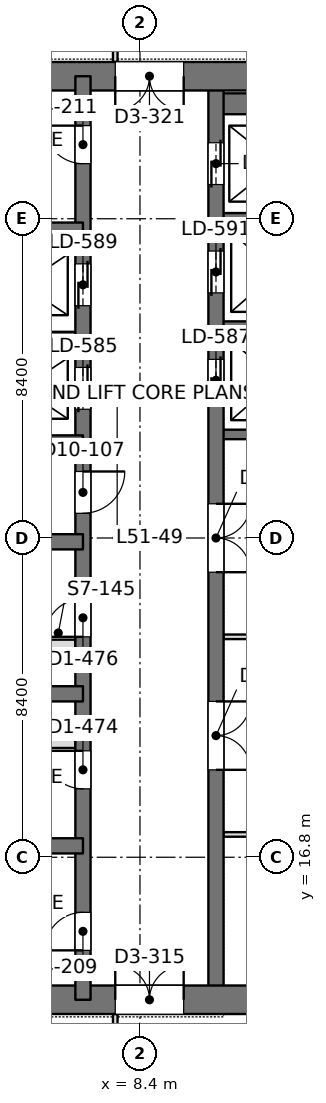
"""IFC4 building model, lengths in metres.
Left out: names, types, materials, properties, quantities, classifications, styles, units other than length and angle.
Written with IfcOpenShell. Run it as: python <this file> out.ifc"""

import sys

from ifc_helpers import new_model, si_unit, direction, frame, frame_2d, origin, place, context, subcontext, project, spatial, rectangle, extrude, element, fill, save


model = new_model("IFC4")
c1 = context("Model", 3, precision=1e-05, world=origin(), true_north=direction((0.0, 1.0)))
c2 = subcontext(c1, "Body", "Model", "MODEL_VIEW")
j1 = project(units=[si_unit("LENGTHUNIT", "METRE"), si_unit("PLANEANGLEUNIT", "RADIAN")], contexts=[c1])
p1 = place(None, origin())
s1 = spatial("IfcSite", under=j1, at=p1, CompositionType="ELEMENT")
p2 = place(p1, origin())
s2 = spatial("IfcBuilding", under=s1, at=p2, CompositionType="ELEMENT")
p3 = place(p2, frame((0.0, 0.0, 223.8)))
s3 = spatial("IfcBuildingStorey", under=s2, at=p3, CompositionType="ELEMENT", Elevation=223.8)
p4 = place(p3, frame((-1.125, 13.05, 0.0), z_axis=(0.0, 0.0, 1.0), x_axis=(1.0, 0.0, 0.0)))
e1 = element("IfcWall", 1, at=p4, inside=s3, PredefinedType="SHEAR", context=c2, shape_type="SweptSolid", body=[
    extrude(rectangle(XDim=17.85, YDim=0.75, at=frame_2d((8.925, 0.0))), origin(), (0.0, 0.0, 1.0), 4.2),
])
p5 = place(p4, frame((8.875, 0.0, 0.0)))
e2 = element("IfcOpeningElement", 2, at=p5, cuts=e1, PredefinedType="OPENING", context=c2, shape_type="SweptSolid", body=[
    extrude(rectangle(XDim=1.8, YDim=2.4, at=frame_2d((0.9, 1.2))), frame((0.0, 0.385, 0.0), z_axis=(0.0, -1.0, 0.0), x_axis=(1.0, 0.0, 0.0)), (0.0, 0.0, 1.0), 0.77),
])
p6 = place(p3, frame((-1.125, 37.35, 0.0), z_axis=(0.0, 0.0, 1.0), x_axis=(1.0, 0.0, 0.0)))
e3 = element("IfcWall", 3, at=p6, inside=s3, PredefinedType="SHEAR", context=c2, shape_type="SweptSolid", body=[
    extrude(rectangle(XDim=17.85, YDim=0.75, at=frame_2d((8.925, 0.0))), origin(), (0.0, 0.0, 1.0), 4.2),
])
p7 = place(p6, frame((8.875, 0.0, 0.0)))
e4 = element("IfcOpeningElement", 4, at=p7, cuts=e3, PredefinedType="OPENING", context=c2, shape_type="SweptSolid", body=[
    extrude(rectangle(XDim=1.8, YDim=2.4, at=frame_2d((0.9, 1.2))), frame((0.0, 0.385, 0.0), z_axis=(0.0, -1.0, 0.0), x_axis=(1.0, 0.0, 0.0)), (0.0, 0.0, 1.0), 0.77),
])
p8 = place(p3, frame((6.9, 13.05, 0.0), z_axis=(0.0, 0.0, 1.0), x_axis=(0.0, 1.0, 0.0)))
e5 = element("IfcWall", 5, at=p8, inside=s3, PredefinedType="SHEAR", context=c2, shape_type="SweptSolid", body=[
    extrude(rectangle(XDim=24.3, YDim=0.4, at=frame_2d((12.15, 0.0))), origin(), (0.0, 0.0, 1.0), 4.2),
])
p9 = place(p8, frame((1.3, 0.0, 0.0)))
e6 = element("IfcOpeningElement", 6, at=p9, cuts=e5, PredefinedType="OPENING", context=c2, shape_type="SweptSolid", body=[
    extrude(rectangle(XDim=1.0, YDim=2.2, at=frame_2d((0.5, 1.1))), frame((0.0, 0.21, 0.0), z_axis=(0.0, -1.0, 0.0), x_axis=(1.0, 0.0, 0.0)), (0.0, 0.0, 1.0), 0.42),
])
p10 = place(p8, frame((22.0, 0.0, 0.0)))
e7 = element("IfcOpeningElement", 7, at=p10, cuts=e5, PredefinedType="OPENING", context=c2, shape_type="SweptSolid", body=[
    extrude(rectangle(XDim=1.0, YDim=2.2, at=frame_2d((0.5, 1.1))), frame((0.0, 0.21, 0.0), z_axis=(0.0, -1.0, 0.0), x_axis=(1.0, 0.0, 0.0)), (0.0, 0.0, 1.0), 0.42),
])
p11 = place(p8, frame((5.55, 0.0, 0.0)))
e8 = element("IfcOpeningElement", 8, at=p11, cuts=e5, PredefinedType="OPENING", context=c2, shape_type="SweptSolid", body=[
    extrude(rectangle(XDim=1.0, YDim=2.2, at=frame_2d((0.5, 1.1))), frame((0.0, 0.21, 0.0), z_axis=(0.0, -1.0, 0.0), x_axis=(1.0, 0.0, 0.0)), (0.0, 0.0, 1.0), 0.42),
])
p12 = place(p8, frame((9.55, 0.0, 0.0)))
e9 = element("IfcOpeningElement", 9, at=p12, cuts=e5, PredefinedType="OPENING", context=c2, shape_type="SweptSolid", body=[
    extrude(rectangle(XDim=1.0, YDim=2.2, at=frame_2d((0.5, 1.1))), frame((0.0, 0.21, 0.0), z_axis=(0.0, -1.0, 0.0), x_axis=(1.0, 0.0, 0.0)), (0.0, 0.0, 1.0), 0.42),
])
p13 = place(p8, frame((12.8, 0.0, 0.0)))
e10 = element("IfcOpeningElement", 10, at=p13, cuts=e5, PredefinedType="OPENING", context=c2, shape_type="SweptSolid", body=[
    extrude(rectangle(XDim=1.1, YDim=2.2, at=frame_2d((0.55, 1.1))), frame((0.0, 0.21, 0.0), z_axis=(0.0, -1.0, 0.0), x_axis=(1.0, 0.0, 0.0)), (0.0, 0.0, 1.0), 0.42),
])
p14 = place(p8, frame((15.538, 0.0, 0.0)))
e11 = element("IfcOpeningElement", 11, at=p14, cuts=e5, PredefinedType="OPENING", context=c2, shape_type="SweptSolid", body=[
    extrude(rectangle(XDim=1.1, YDim=2.2, at=frame_2d((0.55, 1.1))), frame((0.0, 0.21, 0.0), z_axis=(0.0, -1.0, 0.0), x_axis=(1.0, 0.0, 0.0)), (0.0, 0.0, 1.0), 0.42),
])
p15 = place(p8, frame((18.262, 0.0, 0.0)))
e12 = element("IfcOpeningElement", 12, at=p15, cuts=e5, PredefinedType="OPENING", context=c2, shape_type="SweptSolid", body=[
    extrude(rectangle(XDim=1.1, YDim=2.2, at=frame_2d((0.55, 1.1))), frame((0.0, 0.21, 0.0), z_axis=(0.0, -1.0, 0.0), x_axis=(1.0, 0.0, 0.0)), (0.0, 0.0, 1.0), 0.42),
])
p16 = place(p3, frame((10.4, 13.05, 0.0), z_axis=(0.0, 0.0, 1.0), x_axis=(0.0, 1.0, 0.0)))
e13 = element("IfcWall", 13, at=p16, inside=s3, PredefinedType="SHEAR", context=c2, shape_type="SweptSolid", body=[
    extrude(rectangle(XDim=24.3, YDim=0.4, at=frame_2d((12.15, 0.0))), origin(), (0.0, 0.0, 1.0), 4.2),
])
p17 = place(p16, frame((15.75, 0.0, 0.0)))
e14 = element("IfcOpeningElement", 14, at=p17, cuts=e13, PredefinedType="OPENING", context=c2, shape_type="SweptSolid", body=[
    extrude(rectangle(XDim=1.1, YDim=2.2, at=frame_2d((0.55, 1.1))), frame((0.0, 0.21, 0.0), z_axis=(0.0, -1.0, 0.0), x_axis=(1.0, 0.0, 0.0)), (0.0, 0.0, 1.0), 0.42),
])
p18 = place(p16, frame((18.6, 0.0, 0.0)))
e15 = element("IfcOpeningElement", 15, at=p18, cuts=e13, PredefinedType="OPENING", context=c2, shape_type="SweptSolid", body=[
    extrude(rectangle(XDim=1.1, YDim=2.2, at=frame_2d((0.55, 1.1))), frame((0.0, 0.21, 0.0), z_axis=(0.0, -1.0, 0.0), x_axis=(1.0, 0.0, 0.0)), (0.0, 0.0, 1.0), 0.42),
])
p19 = place(p16, frame((21.45, 0.0, 0.0)))
e16 = element("IfcOpeningElement", 16, at=p19, cuts=e13, PredefinedType="OPENING", context=c2, shape_type="SweptSolid", body=[
    extrude(rectangle(XDim=1.1, YDim=2.2, at=frame_2d((0.55, 1.1))), frame((0.0, 0.21, 0.0), z_axis=(0.0, -1.0, 0.0), x_axis=(1.0, 0.0, 0.0)), (0.0, 0.0, 1.0), 0.42),
])
p20 = place(p16, frame((6.05, 0.0, 0.0)))
e17 = element("IfcOpeningElement", 17, at=p20, cuts=e13, PredefinedType="OPENING", context=c2, shape_type="SweptSolid", body=[
    extrude(rectangle(XDim=1.8, YDim=2.4, at=frame_2d((0.9, 1.2))), frame((0.0, 0.21, 0.0), z_axis=(0.0, -1.0, 0.0), x_axis=(1.0, 0.0, 0.0)), (0.0, 0.0, 1.0), 0.42),
])
p21 = place(p16, frame((11.25, 0.0, 0.0)))
e18 = element("IfcOpeningElement", 18, at=p21, cuts=e13, PredefinedType="OPENING", context=c2, shape_type="SweptSolid", body=[
    extrude(rectangle(XDim=1.8, YDim=2.4, at=frame_2d((0.9, 1.2))), frame((0.0, 0.21, 0.0), z_axis=(0.0, -1.0, 0.0), x_axis=(1.0, 0.0, 0.0)), (0.0, 0.0, 1.0), 0.42),
])
for number, where, z_axis, x_axis in (
    (19, (-0.75, 17.1, 0.0), (0.0, 0.0, 1.0), (1.0, 0.0, 0.0)),
    (20, (-0.75, 21.1, 0.0), (0.0, 0.0, 1.0), (1.0, 0.0, 0.0)),
    (21, (-0.75, 25.1, 0.0), (0.0, 0.0, 1.0), (1.0, 0.0, 0.0)),
    (22, (-0.75, 27.7, 0.0), (0.0, 0.0, 1.0), (1.0, 0.0, 0.0)),
    (23, (-0.75, 33.3, 0.0), (0.0, 0.0, 1.0), (1.0, 0.0, 0.0)),
):
    element("IfcWall", number, at=place(p3, frame(where, z_axis=z_axis, x_axis=x_axis)), inside=s3, PredefinedType="SHEAR", context=c2, shape_type="SweptSolid", body=[
        extrude(rectangle(XDim=7.65, YDim=0.4, at=frame_2d((3.825, 0.0))), origin(), (0.0, 0.0, 1.0), 4.2),
    ])
p22 = place(p3, frame((3.7, 30.5, 0.0), z_axis=(0.0, 0.0, 1.0), x_axis=(1.0, 0.0, 0.0)))
e24 = element("IfcWall", 24, at=p22, inside=s3, PredefinedType="SHEAR", context=c2, shape_type="SweptSolid", body=[
    extrude(rectangle(XDim=3.2, YDim=0.25, at=frame_2d((1.6, 0.0))), origin(), (0.0, 0.0, 1.0), 4.2),
])
p23 = place(p3, frame((10.4, 27.925, 0.0), z_axis=(0.0, 0.0, 1.0), x_axis=(1.0, 0.0, 0.0)))
e25 = element("IfcWall", 25, at=p23, inside=s3, PredefinedType="SHEAR", context=c2, shape_type="SweptSolid", body=[
    extrude(rectangle(XDim=5.95, YDim=0.25, at=frame_2d((2.975, 0.0))), origin(), (0.0, 0.0, 1.0), 4.2),
])
for number, where, z_axis, x_axis in (
    (26, (10.4, 30.775, 0.0), (0.0, 0.0, 1.0), (1.0, 0.0, 0.0)),
    (27, (10.4, 33.625, 0.0), (0.0, 0.0, 1.0), (1.0, 0.0, 0.0)),
):
    element("IfcWall", number, at=place(p3, frame(where, z_axis=z_axis, x_axis=x_axis)), inside=s3, PredefinedType="SHEAR", context=c2, shape_type="SweptSolid", body=[
        extrude(rectangle(XDim=3.2, YDim=0.25, at=frame_2d((1.6, 0.0))), origin(), (0.0, 0.0, 1.0), 4.2),
    ])
p24 = place(p3, frame((10.4, 36.625, 0.0), z_axis=(0.0, 0.0, 1.0), x_axis=(1.0, 0.0, 0.0)))
e28 = element("IfcWall", 28, at=p24, inside=s3, PredefinedType="SHEAR", context=c2, shape_type="SweptSolid", body=[
    extrude(rectangle(XDim=3.2, YDim=0.55, at=frame_2d((1.6, 0.0))), origin(), (0.0, 0.0, 1.0), 4.2),
])
p25 = place(p3, frame((10.598, 17.4, 0.0), z_axis=(0.0, 0.0, 1.0), x_axis=(1.0, 0.0, 0.0)))
e29 = element("IfcWall", 29, at=p25, inside=s3, PredefinedType="PARTITIONING", context=c2, shape_type="SweptSolid", body=[
    extrude(rectangle(XDim=5.904, YDim=0.12, at=frame_2d((2.952, 0.0))), origin(), (0.0, 0.0, 1.0), 3.55),
])
p26 = place(p3, frame((10.598, 22.6, 0.0), z_axis=(0.0, 0.0, 1.0), x_axis=(1.0, 0.0, 0.0)))
e30 = element("IfcWall", 30, at=p26, inside=s3, PredefinedType="PARTITIONING", context=c2, shape_type="SweptSolid", body=[
    extrude(rectangle(XDim=5.053, YDim=0.12, at=frame_2d((2.526, 0.0))), origin(), (0.0, 0.0, 1.0), 4.05),
])
p27 = place(p3, frame((7.75, 11.158, 0.0), z_axis=(0.0, 0.0, 1.0), x_axis=(0.0, 1.0, 0.0)))
e31 = element("IfcWall", 31, at=p27, inside=s3, PredefinedType="PARTITIONING", context=c2, shape_type="SweptSolid", body=[
    extrude(rectangle(XDim=1.518, YDim=0.12, at=frame_2d((0.759, 0.0))), origin(), (0.0, 0.0, 1.0), 4.05),
])
p28 = place(p27, frame((0.192, 0.0, 0.0)))
e32 = element("IfcOpeningElement", 32, at=p28, cuts=e31, PredefinedType="OPENING", context=c2, shape_type="SweptSolid", body=[
    extrude(rectangle(XDim=1.0, YDim=2.4, at=frame_2d((0.5, 1.2))), frame((0.0, 0.07, 0.0), z_axis=(0.0, -1.0, 0.0), x_axis=(1.0, 0.0, 0.0)), (0.0, 0.0, 1.0), 0.14),
])
p29 = place(p3, frame((7.75, 37.724, 0.0), z_axis=(0.0, 0.0, 1.0), x_axis=(0.0, 1.0, 0.0)))
e33 = element("IfcWall", 33, at=p29, inside=s3, PredefinedType="PARTITIONING", context=c2, shape_type="SweptSolid", body=[
    extrude(rectangle(XDim=1.518, YDim=0.12, at=frame_2d((0.759, 0.0))), origin(), (0.0, 0.0, 1.0), 4.05),
])
p30 = place(p29, frame((0.326, 0.0, 0.0)))
e34 = element("IfcOpeningElement", 34, at=p30, cuts=e33, PredefinedType="OPENING", context=c2, shape_type="SweptSolid", body=[
    extrude(rectangle(XDim=1.0, YDim=2.4, at=frame_2d((0.5, 1.2))), frame((0.0, 0.07, 0.0), z_axis=(0.0, -1.0, 0.0), x_axis=(1.0, 0.0, 0.0)), (0.0, 0.0, 1.0), 0.14),
])
p31 = place(p3, frame((0.025, 22.4, 0.0), z_axis=(0.0, 0.0, 1.0), x_axis=(1.0, 0.0, 0.0)))
e35 = element("IfcWall", 35, at=p31, inside=s3, PredefinedType="PARTITIONING", context=c2, shape_type="SweptSolid", body=[
    extrude(rectangle(XDim=6.675, YDim=0.25, at=frame_2d((3.337, 0.0))), origin(), (0.0, 0.0, 1.0), 4.0),
])
p32 = place(p31, frame((2.913, 0.0, 0.0)))
e36 = element("IfcOpeningElement", 36, at=p32, cuts=e35, PredefinedType="OPENING", context=c2, shape_type="SweptSolid", body=[
    extrude(rectangle(XDim=0.9, YDim=2.2, at=frame_2d((0.45, 1.1))), frame((0.0, 0.135, 0.0), z_axis=(0.0, -1.0, 0.0), x_axis=(1.0, 0.0, 0.0)), (0.0, 0.0, 1.0), 0.27),
])
p33 = place(p3, frame((0.025, 19.8, 0.0), z_axis=(0.0, 0.0, 1.0), x_axis=(1.0, 0.0, 0.0)))
e37 = element("IfcWall", 37, at=p33, inside=s3, PredefinedType="PARTITIONING", context=c2, shape_type="SweptSolid", body=[
    extrude(rectangle(XDim=6.675, YDim=0.25, at=frame_2d((3.337, 0.0))), origin(), (0.0, 0.0, 1.0), 4.0),
])
p34 = place(p33, frame((2.913, 0.0, 0.0)))
e38 = element("IfcOpeningElement", 38, at=p34, cuts=e37, PredefinedType="OPENING", context=c2, shape_type="SweptSolid", body=[
    extrude(rectangle(XDim=0.9, YDim=2.2, at=frame_2d((0.45, 1.1))), frame((0.0, 0.135, 0.0), z_axis=(0.0, -1.0, 0.0), x_axis=(1.0, 0.0, 0.0)), (0.0, 0.0, 1.0), 0.27),
])
p35 = place(p5, origin())
e39 = element("IfcDoor", 39, at=p35, inside=s3, OperationType="DOUBLE_DOOR_SINGLE_SWING", PredefinedType="DOOR", context=c2, shape_type="SweptSolid", body=[
    extrude(rectangle(XDim=1.8, YDim=2.4, at=frame_2d((0.9, 1.2))), frame((0.0, 0.025, 0.0), z_axis=(0.0, -1.0, 0.0), x_axis=(1.0, 0.0, 0.0)), (0.0, 0.0, 1.0), 0.05),
])
fill(e2, e39)
p36 = place(p7, frame((1.8, 0.0, 0.0), z_axis=(0.0, 0.0, 1.0), x_axis=(-1.0, 0.0, 0.0)))
e40 = element("IfcDoor", 40, at=p36, inside=s3, OperationType="DOUBLE_DOOR_SINGLE_SWING", PredefinedType="DOOR", context=c2, shape_type="SweptSolid", body=[
    extrude(rectangle(XDim=1.8, YDim=2.4, at=frame_2d((0.9, 1.2))), frame((0.0, 0.025, 0.0), z_axis=(0.0, -1.0, 0.0), x_axis=(1.0, 0.0, 0.0)), (0.0, 0.0, 1.0), 0.05),
])
fill(e4, e40)
p37 = place(p9, origin())
e41 = element("IfcDoor", 41, at=p37, inside=s3, OperationType="SINGLE_SWING_LEFT", PredefinedType="DOOR", context=c2, shape_type="SweptSolid", body=[
    extrude(rectangle(XDim=1.0, YDim=2.2, at=frame_2d((0.5, 1.1))), frame((0.0, 0.025, 0.0), z_axis=(0.0, -1.0, 0.0), x_axis=(1.0, 0.0, 0.0)), (0.0, 0.0, 1.0), 0.05),
])
fill(e6, e41)
p38 = place(p10, origin())
e42 = element("IfcDoor", 42, at=p38, inside=s3, OperationType="SINGLE_SWING_RIGHT", PredefinedType="DOOR", context=c2, shape_type="SweptSolid", body=[
    extrude(rectangle(XDim=1.0, YDim=2.2, at=frame_2d((0.5, 1.1))), frame((0.0, 0.025, 0.0), z_axis=(0.0, -1.0, 0.0), x_axis=(1.0, 0.0, 0.0)), (0.0, 0.0, 1.0), 0.05),
])
fill(e7, e42)
p39 = place(p11, origin())
e43 = element("IfcDoor", 43, at=p39, inside=s3, OperationType="SINGLE_SWING_RIGHT", PredefinedType="DOOR", context=c2, shape_type="SweptSolid", body=[
    extrude(rectangle(XDim=1.0, YDim=2.2, at=frame_2d((0.5, 1.1))), frame((0.0, 0.025, 0.0), z_axis=(0.0, -1.0, 0.0), x_axis=(1.0, 0.0, 0.0)), (0.0, 0.0, 1.0), 0.05),
])
fill(e8, e43)
p40 = place(p12, origin())
e44 = element("IfcDoor", 44, at=p40, inside=s3, OperationType="SINGLE_SWING_LEFT", PredefinedType="DOOR", context=c2, shape_type="SweptSolid", body=[
    extrude(rectangle(XDim=1.0, YDim=2.2, at=frame_2d((0.5, 1.1))), frame((0.0, 0.025, 0.0), z_axis=(0.0, -1.0, 0.0), x_axis=(1.0, 0.0, 0.0)), (0.0, 0.0, 1.0), 0.05),
])
fill(e9, e44)
p41 = place(p13, frame((1.1, 0.0, 0.0), z_axis=(0.0, 0.0, 1.0), x_axis=(-1.0, 0.0, 0.0)))
e45 = element("IfcDoor", 45, at=p41, inside=s3, OperationType="SINGLE_SWING_LEFT", PredefinedType="DOOR", context=c2, shape_type="SweptSolid", body=[
    extrude(rectangle(XDim=1.1, YDim=2.2, at=frame_2d((0.55, 1.1))), frame((0.0, 0.025, 0.0), z_axis=(0.0, -1.0, 0.0), x_axis=(1.0, 0.0, 0.0)), (0.0, 0.0, 1.0), 0.05),
])
fill(e10, e45)
p42 = place(p17, origin())
e46 = element("IfcDoor", 46, at=p42, inside=s3, OperationType="DOUBLE_DOOR_SLIDING", PredefinedType="DOOR", context=c2, shape_type="SweptSolid", body=[
    extrude(rectangle(XDim=1.1, YDim=2.2, at=frame_2d((0.55, 1.1))), frame((0.0, 0.025, 0.0), z_axis=(0.0, -1.0, 0.0), x_axis=(1.0, 0.0, 0.0)), (0.0, 0.0, 1.0), 0.05),
])
fill(e14, e46)
p43 = place(p18, origin())
e47 = element("IfcDoor", 47, at=p43, inside=s3, OperationType="DOUBLE_DOOR_SLIDING", PredefinedType="DOOR", context=c2, shape_type="SweptSolid", body=[
    extrude(rectangle(XDim=1.1, YDim=2.2, at=frame_2d((0.55, 1.1))), frame((0.0, 0.025, 0.0), z_axis=(0.0, -1.0, 0.0), x_axis=(1.0, 0.0, 0.0)), (0.0, 0.0, 1.0), 0.05),
])
fill(e15, e47)
p44 = place(p19, origin())
e48 = element("IfcDoor", 48, at=p44, inside=s3, OperationType="DOUBLE_DOOR_SLIDING", PredefinedType="DOOR", context=c2, shape_type="SweptSolid", body=[
    extrude(rectangle(XDim=1.1, YDim=2.2, at=frame_2d((0.55, 1.1))), frame((0.0, 0.025, 0.0), z_axis=(0.0, -1.0, 0.0), x_axis=(1.0, 0.0, 0.0)), (0.0, 0.0, 1.0), 0.05),
])
fill(e16, e48)
p45 = place(p14, origin())
e49 = element("IfcDoor", 49, at=p45, inside=s3, OperationType="DOUBLE_DOOR_SLIDING", PredefinedType="DOOR", context=c2, shape_type="SweptSolid", body=[
    extrude(rectangle(XDim=1.1, YDim=2.2, at=frame_2d((0.55, 1.1))), frame((0.0, 0.025, 0.0), z_axis=(0.0, -1.0, 0.0), x_axis=(1.0, 0.0, 0.0)), (0.0, 0.0, 1.0), 0.05),
])
fill(e11, e49)
p46 = place(p15, origin())
e50 = element("IfcDoor", 50, at=p46, inside=s3, OperationType="DOUBLE_DOOR_SLIDING", PredefinedType="DOOR", context=c2, shape_type="SweptSolid", body=[
    extrude(rectangle(XDim=1.1, YDim=2.2, at=frame_2d((0.55, 1.1))), frame((0.0, 0.025, 0.0), z_axis=(0.0, -1.0, 0.0), x_axis=(1.0, 0.0, 0.0)), (0.0, 0.0, 1.0), 0.05),
])
fill(e12, e50)
p47 = place(p20, frame((1.8, 0.0, 0.0), z_axis=(0.0, 0.0, 1.0), x_axis=(-1.0, 0.0, 0.0)))
e51 = element("IfcDoor", 51, at=p47, inside=s3, OperationType="DOUBLE_DOOR_SINGLE_SWING", PredefinedType="DOOR", context=c2, shape_type="SweptSolid", body=[
    extrude(rectangle(XDim=1.8, YDim=2.4, at=frame_2d((0.9, 1.2))), frame((0.0, 0.025, 0.0), z_axis=(0.0, -1.0, 0.0), x_axis=(1.0, 0.0, 0.0)), (0.0, 0.0, 1.0), 0.05),
])
fill(e17, e51)
p48 = place(p21, frame((1.8, 0.0, 0.0), z_axis=(0.0, 0.0, 1.0), x_axis=(-1.0, 0.0, 0.0)))
e52 = element("IfcDoor", 52, at=p48, inside=s3, OperationType="DOUBLE_DOOR_SINGLE_SWING", PredefinedType="DOOR", context=c2, shape_type="SweptSolid", body=[
    extrude(rectangle(XDim=1.8, YDim=2.4, at=frame_2d((0.9, 1.2))), frame((0.0, 0.025, 0.0), z_axis=(0.0, -1.0, 0.0), x_axis=(1.0, 0.0, 0.0)), (0.0, 0.0, 1.0), 0.05),
])
fill(e18, e52)
save(model, sys.argv[1])
